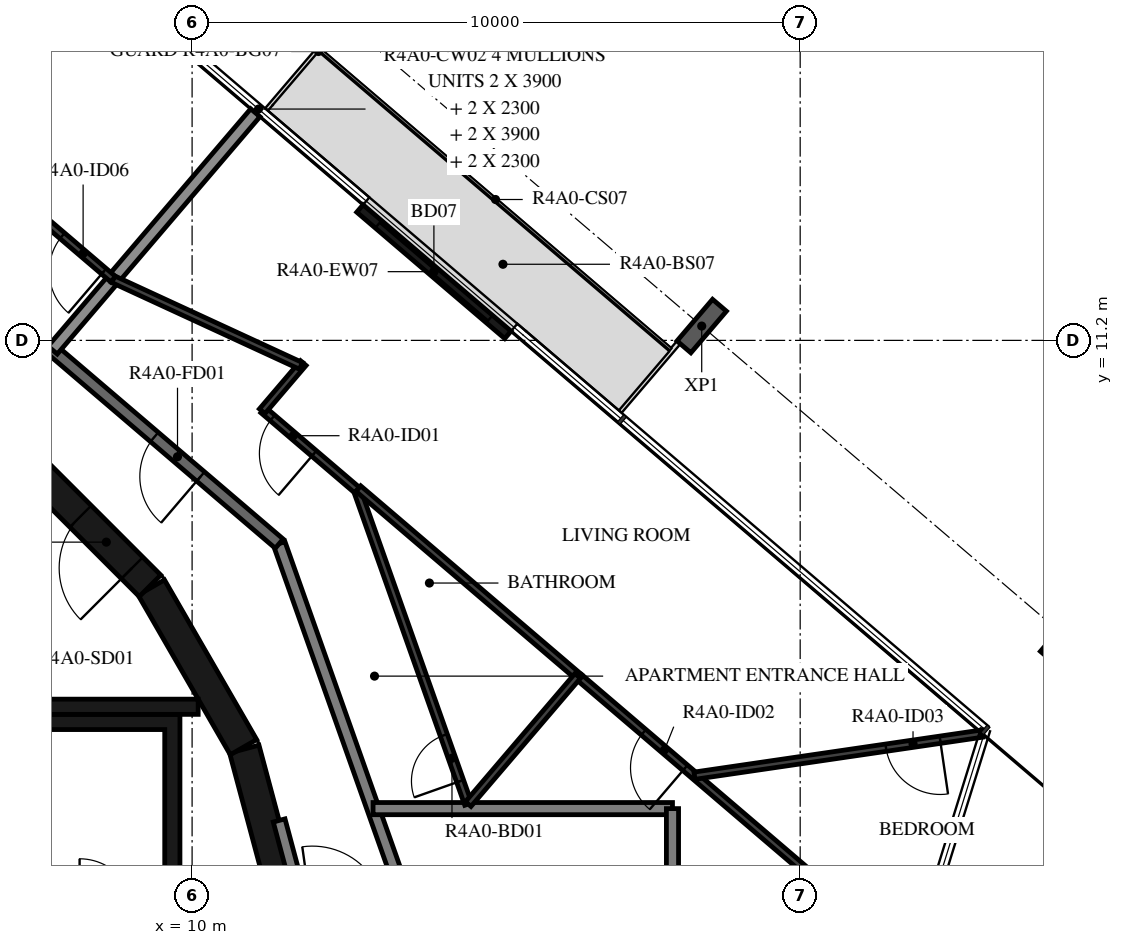
"""IFC4 building model, lengths in metres.
Left out: names, types, materials, properties, quantities, classifications, styles, units other than length and angle.
Written with IfcOpenShell. Run it as: python <this file> out.ifc"""

import sys

from ifc_helpers import new_model, si_unit, direction, frame, frame_2d, origin, origin_2d, place, context, subcontext, project, spatial, polyline, rectangle, i_section, outline, extrude, element, fill, save


model = new_model("IFC4")
c1 = context("Model", 3, precision=1e-05, world=origin(), true_north=direction((0.0, 1.0)))
c2 = subcontext(c1, "Body", "Model", "MODEL_VIEW")
j1 = project(units=[si_unit("LENGTHUNIT", "METRE"), si_unit("PLANEANGLEUNIT", "RADIAN")], contexts=[c1])
p1 = place(None, origin())
s1 = spatial("IfcSite", under=j1, at=p1, CompositionType="ELEMENT")
p2 = place(p1, origin())
s2 = spatial("IfcBuilding", under=s1, at=p2, CompositionType="ELEMENT")
p3 = place(p2, frame((0.0, 0.0, 158.7)))
s3 = spatial("IfcBuildingStorey", under=s2, at=p3, CompositionType="ELEMENT", Elevation=158.7)
for number, where, z_axis, x_axis in (
    (1, (24.358, 6.331, -0.38), (0.0, 0.0, 1.0), (0.76, -0.649, 0.0)),
    (2, (18.381, 11.436, -0.38), (0.0, 0.0, 1.0), (0.76, -0.649, 0.0)),
):
    element("IfcColumn", number, at=place(p3, frame(where, z_axis=z_axis, x_axis=x_axis)), inside=s3, PredefinedType="COLUMN", context=c2, shape_type="SweptSolid", body=[
        extrude(i_section(OverallWidth=0.3, OverallDepth=0.9, WebThickness=0.019, FlangeThickness=0.035, FilletRadius=0.03, at=origin_2d()), origin(), (0.0, 0.0, 1.0), 3.5),
    ])
p4 = place(p3, frame((15.193, 11.291, 0.0), z_axis=(0.0, 0.0, 1.0), x_axis=(-0.760391731187, 0.649464714317, 0.0)))
e3 = element("IfcWall", 3, at=p4, inside=s3, PredefinedType="STANDARD", context=c2, shape_type="SweptSolid", body=[
    extrude(rectangle(XDim=3.2, YDim=0.16, at=frame_2d((1.6, 0.0))), origin(), (0.0, 0.0, 1.0), 3.12),
])
p5 = place(p4, frame((0.4, 0.0, 0.0)))
e4 = element("IfcOpeningElement", 4, at=p5, cuts=e3, PredefinedType="OPENING", context=c2, shape_type="SweptSolid", body=[
    extrude(rectangle(XDim=2.4, YDim=2.4, at=frame_2d((1.2, 1.2))), frame((0.0, 0.09, 0.0), z_axis=(0.0, -1.0, 0.0), x_axis=(1.0, 0.0, 0.0)), (0.0, 0.0, 1.0), 0.18),
])
for number, where, z_axis, x_axis in (
    (5, (11.643, 1.55, 0.0), (0.0, 0.0, 1.0), (-0.259, 0.966, 0.0)),
    (6, (10.845, 4.51, 0.0), (0.0, 0.0, 1.0), (-0.5, 0.866, 0.0)),
):
    element("IfcWall", number, at=place(p3, frame(where, z_axis=z_axis, x_axis=x_axis)), inside=s3, PredefinedType="SHEAR", context=c2, shape_type="SweptSolid", body=[
        extrude(rectangle(XDim=3.033, YDim=0.5, at=frame_2d((1.516, 0.0))), origin(), (0.0, 0.0, 1.0), 3.12),
    ])
p6 = place(p3, frame((9.308, 7.164, 0.0), z_axis=(0.0, 0.0, 1.0), x_axis=(-0.707106781187, 0.707106781187, 0.0)))
e7 = element("IfcWall", 7, at=p6, inside=s3, PredefinedType="SHEAR", context=c2, shape_type="SweptSolid", body=[
    extrude(rectangle(XDim=3.032, YDim=0.5, at=frame_2d((1.516, 0.0))), origin(), (0.0, 0.0, 1.0), 3.12),
])
p7 = place(p6, frame((0.416, 0.0, 0.0)))
e8 = element("IfcOpeningElement", 8, at=p7, cuts=e7, PredefinedType="OPENING", context=c2, shape_type="SweptSolid", body=[
    extrude(rectangle(XDim=1.2, YDim=2.1, at=frame_2d((0.6, 1.05))), frame((0.0, 0.26, 0.0), z_axis=(0.0, -1.0, 0.0), x_axis=(1.0, 0.0, 0.0)), (0.0, 0.0, 1.0), 0.52),
])
p8 = place(p3, frame((7.0, 5.175, 0.0), z_axis=(0.0, 0.0, 1.0), x_axis=(1.0, 0.0, 0.0)))
e9 = element("IfcWall", 9, at=p8, inside=s3, PredefinedType="SHEAR", context=c2, shape_type="SweptSolid", body=[
    extrude(rectangle(XDim=3.1, YDim=0.25, at=frame_2d((1.55, 0.0))), origin(), (0.0, 0.0, 1.0), 3.12),
])
p9 = place(p3, origin())
e10 = element("IfcWall", 10, at=p9, inside=s3, PredefinedType="SHEAR", context=c2, shape_type="SweptSolid", body=[
    extrude(outline(polyline([(-9.55, 4.8), (-1.2, 4.8), (-1.2, 1.9), (-0.95, 1.9), (-0.95, 4.8), (0.95, 4.8), (0.95, 1.9), (1.2, 1.9), (1.2, 4.8), (3.1, 4.8), (3.1, 1.9), (3.35, 1.9), (3.35, 4.8), (5.25, 4.8), (5.25, 1.9), (5.5, 1.9), (5.5, 4.8), (7.4, 4.8), (7.4, 1.9), (7.65, 1.9), (7.65, 4.8), (9.55, 4.8), (9.55, 1.9), (9.8, 1.9), (9.8, 4.8), (9.8, 5.05), (-9.8, 5.05), (-9.8, 4.8), (-9.8, 1.9), (-9.55, 1.9), (-9.55, 4.8)])), origin(), (0.0, 0.0, 1.0), 3.12),
])
p10 = place(p3, frame((11.87, 1.668, 0.0), z_axis=(0.0, 0.0, 1.0), x_axis=(-0.258836880648, 0.965921047093, 0.0)))
e11 = element("IfcWall", 11, at=p10, inside=s3, PredefinedType="STANDARD", context=c2, shape_type="SweptSolid", body=[
    extrude(rectangle(XDim=1.695, YDim=0.2, at=frame_2d((0.848, 0.0))), origin(), (0.0, 0.0, 1.0), 3.12),
])
p11 = place(p3, frame((13.542, 1.903, 0.0), z_axis=(0.0, 0.0, 1.0), x_axis=(-0.333808508206, 0.942640907159, 0.0)))
e12 = element("IfcWall", 12, at=p11, inside=s3, PredefinedType="STANDARD", context=c2, shape_type="SweptSolid", body=[
    extrude(rectangle(XDim=6.317, YDim=0.2, at=frame_2d((3.158, 0.0))), origin(), (0.0, 0.0, 1.0), 3.12),
])
p12 = place(p3, frame((11.433, 7.858, 0.0), z_axis=(0.0, 0.0, 1.0), x_axis=(-0.760412154545, 0.649440801937, 0.0)))
e13 = element("IfcWall", 13, at=p12, inside=s3, PredefinedType="STANDARD", context=c2, shape_type="SweptSolid", body=[
    extrude(rectangle(XDim=7.181, YDim=0.2, at=frame_2d((3.59, 0.0))), origin(), (0.0, 0.0, 1.0), 3.12),
])
p13 = place(p12, frame((1.7, 0.0, 0.0)))
e14 = element("IfcOpeningElement", 14, at=p13, cuts=e13, PredefinedType="OPENING", context=c2, shape_type="SweptSolid", body=[
    extrude(rectangle(XDim=1.0, YDim=2.1, at=frame_2d((0.5, 1.05))), frame((0.0, 0.11, 0.0), z_axis=(0.0, -1.0, 0.0), x_axis=(1.0, 0.0, 0.0)), (0.0, 0.0, 1.0), 0.22),
])
p14 = place(p12, frame((5.101, 0.0, 0.0)))
e15 = element("IfcOpeningElement", 15, at=p14, cuts=e13, PredefinedType="OPENING", context=c2, shape_type="SweptSolid", body=[
    extrude(rectangle(XDim=1.0, YDim=2.1, at=frame_2d((0.5, 1.05))), frame((0.0, 0.11, 0.0), z_axis=(0.0, -1.0, 0.0), x_axis=(1.0, 0.0, 0.0)), (0.0, 0.0, 1.0), 0.22),
])
p15 = place(p3, frame((17.9, 3.5, 0.0), z_axis=(0.0, 0.0, 1.0), x_axis=(-1.0, 0.0, 0.0)))
e16 = element("IfcWall", 16, at=p15, inside=s3, PredefinedType="STANDARD", context=c2, shape_type="SweptSolid", body=[
    extrude(rectangle(XDim=4.924, YDim=0.2, at=frame_2d((2.462, 0.0))), origin(), (0.0, 0.0, 1.0), 3.12),
])
p16 = place(p3, frame((17.9, -3.318, 0.0), z_axis=(0.0, 0.0, 1.0), x_axis=(0.0, 1.0, 0.0)))
e17 = element("IfcWall", 17, at=p16, inside=s3, PredefinedType="STANDARD", context=c2, shape_type="SweptSolid", body=[
    extrude(rectangle(XDim=6.818, YDim=0.2, at=frame_2d((3.409, 0.0))), origin(), (0.0, 0.0, 1.0), 3.12),
])
p17 = place(p3, frame((11.04, 14.943, 0.0), z_axis=(0.0, 0.0, 1.0), x_axis=(-0.649442880087, -0.760410379666, 0.0)))
e18 = element("IfcWall", 18, at=p17, inside=s3, PredefinedType="STANDARD", context=c2, shape_type="SweptSolid", body=[
    extrude(rectangle(XDim=5.133, YDim=0.2, at=frame_2d((2.566, 0.0))), origin(), (0.0, 0.0, 1.0), 2.73),
])
p18 = place(p3, frame((14.541, 3.575, 0.0), z_axis=(0.0, 0.0, 1.0), x_axis=(-0.333799280318, 0.942644174893, 0.0)))
e19 = element("IfcWall", 19, at=p18, inside=s3, PredefinedType="PARTITIONING", context=c2, shape_type="SweptSolid", body=[
    extrude(rectangle(XDim=5.477, YDim=0.12, at=frame_2d((2.738, 0.0))), origin(), (0.0, 0.0, 1.0), 3.12),
])
p19 = place(p18, frame((0.4, 0.0, 0.0)))
e20 = element("IfcOpeningElement", 20, at=p19, cuts=e19, PredefinedType="OPENING", context=c2, shape_type="SweptSolid", body=[
    extrude(rectangle(XDim=0.8, YDim=2.1, at=frame_2d((0.4, 1.05))), frame((0.0, 0.07, 0.0), z_axis=(0.0, -1.0, 0.0), x_axis=(1.0, 0.0, 0.0)), (0.0, 0.0, 1.0), 0.14),
])
p20 = place(p3, frame((12.713, 8.737, 0.0), z_axis=(0.0, 0.0, 1.0), x_axis=(-0.760410825807, 0.649442357716, 0.0)))
e21 = element("IfcWall", 21, at=p20, inside=s3, PredefinedType="PARTITIONING", context=c2, shape_type="SweptSolid", body=[
    extrude(rectangle(XDim=2.029, YDim=0.12, at=frame_2d((1.014, 0.0))), origin(), (0.0, 0.0, 1.0), 3.12),
])
p21 = place(p20, frame((0.929, 0.0, 0.0)))
e22 = element("IfcOpeningElement", 22, at=p21, cuts=e21, PredefinedType="OPENING", context=c2, shape_type="SweptSolid", body=[
    extrude(rectangle(XDim=0.9, YDim=2.1, at=frame_2d((0.45, 1.05))), frame((0.0, 0.07, 0.0), z_axis=(0.0, -1.0, 0.0), x_axis=(1.0, 0.0, 0.0)), (0.0, 0.0, 1.0), 0.14),
])
p22 = place(p3, frame((12.734, 8.762, 0.0), z_axis=(0.0, 0.0, 1.0), x_axis=(0.760390484255, -0.649466174219, 0.0)))
e23 = element("IfcWall", 23, at=p22, inside=s3, PredefinedType="PARTITIONING", context=c2, shape_type="SweptSolid", body=[
    extrude(rectangle(XDim=4.783, YDim=0.12, at=frame_2d((2.391, 0.0))), origin(), (0.0, 0.0, 1.0), 3.12),
])
p23 = place(p3, frame((11.153, 10.034, 0.0), z_axis=(0.0, 0.0, 1.0), x_axis=(0.649381401329, 0.760462882466, 0.0)))
e24 = element("IfcWall", 24, at=p23, inside=s3, PredefinedType="PARTITIONING", context=c2, shape_type="SweptSolid", body=[
    extrude(rectangle(XDim=1.042, YDim=0.12, at=frame_2d((0.521, 0.0))), origin(), (0.0, 0.0, 1.0), 3.12),
])
p24 = place(p3, frame((11.79, 10.781, 0.0), z_axis=(0.0, 0.0, 1.0), x_axis=(-0.907999296286, 0.418971691101, 0.0)))
e25 = element("IfcWall", 25, at=p24, inside=s3, PredefinedType="PARTITIONING", context=c2, shape_type="SweptSolid", body=[
    extrude(rectangle(XDim=3.401, YDim=0.12, at=frame_2d((1.701, 0.0))), origin(), (0.0, 0.0, 1.0), 3.12),
])
p25 = place(p3, frame((23.411, -0.357, 0.0), z_axis=(0.0, 0.0, 1.0), x_axis=(-0.76041871148, 0.649433124525, 0.0)))
e26 = element("IfcWall", 26, at=p25, inside=s3, PredefinedType="PARTITIONING", context=c2, shape_type="SweptSolid", body=[
    extrude(rectangle(XDim=9.259, YDim=0.12, at=frame_2d((4.629, 0.0))), origin(), (0.0, 0.0, 1.0), 3.12),
])
p26 = place(p25, frame((6.972, 0.0, 0.0)))
e27 = element("IfcOpeningElement", 27, at=p26, cuts=e26, PredefinedType="OPENING", context=c2, shape_type="SweptSolid", body=[
    extrude(rectangle(XDim=0.9, YDim=2.1, at=frame_2d((0.45, 1.05))), frame((0.0, 0.07, 0.0), z_axis=(0.0, -1.0, 0.0), x_axis=(1.0, 0.0, 0.0)), (0.0, 0.0, 1.0), 0.14),
])
p27 = place(p25, frame((0.2, 0.0, 0.0)))
e28 = element("IfcOpeningElement", 28, at=p27, cuts=e26, PredefinedType="OPENING", context=c2, shape_type="SweptSolid", body=[
    extrude(rectangle(XDim=0.9, YDim=2.1, at=frame_2d((0.45, 1.05))), frame((0.0, 0.07, 0.0), z_axis=(0.0, -1.0, 0.0), x_axis=(1.0, 0.0, 0.0)), (0.0, 0.0, 1.0), 0.14),
])
p28 = place(p3, frame((16.341, 5.682, 0.0), z_axis=(0.0, 0.0, 1.0), x_axis=(-0.64946993237, -0.76038727432, 0.0)))
e29 = element("IfcWall", 29, at=p28, inside=s3, PredefinedType="PARTITIONING", context=c2, shape_type="SweptSolid", body=[
    extrude(rectangle(XDim=2.771, YDim=0.12, at=frame_2d((1.386, 0.0))), origin(), (0.0, 0.0, 1.0), 3.12),
])
p29 = place(p3, frame((22.994, 4.734, 0.0), z_axis=(0.0, 0.0, 1.0), x_axis=(-0.989449286977, -0.144879634529, 0.0)))
e30 = element("IfcWall", 30, at=p29, inside=s3, PredefinedType="PARTITIONING", context=c2, shape_type="SweptSolid", body=[
    extrude(rectangle(XDim=4.782, YDim=0.12, at=frame_2d((2.391, 0.0))), origin(), (0.0, 0.0, 1.0), 3.12),
])
p30 = place(p29, frame((0.7, 0.0, 0.0)))
e31 = element("IfcOpeningElement", 31, at=p30, cuts=e30, PredefinedType="OPENING", context=c2, shape_type="SweptSolid", body=[
    extrude(rectangle(XDim=0.9, YDim=2.1, at=frame_2d((0.45, 1.05))), frame((0.0, 0.07, 0.0), z_axis=(0.0, -1.0, 0.0), x_axis=(1.0, 0.0, 0.0)), (0.0, 0.0, 1.0), 0.14),
])
p31 = place(p3, frame((8.702, 12.206, 0.0), z_axis=(0.0, 0.0, 1.0), x_axis=(-0.760401313718, 0.649453494945, 0.0)))
e32 = element("IfcWall", 32, at=p31, inside=s3, PredefinedType="PARTITIONING", context=c2, shape_type="SweptSolid", body=[
    extrude(rectangle(XDim=16.724, YDim=0.12, at=frame_2d((8.362, 0.0))), origin(), (0.0, 0.0, 1.0), 3.12),
])
p32 = place(p31, frame((0.2, 0.0, 0.0)))
e33 = element("IfcOpeningElement", 33, at=p32, cuts=e32, PredefinedType="OPENING", context=c2, shape_type="SweptSolid", body=[
    extrude(rectangle(XDim=0.9, YDim=2.1, at=frame_2d((0.45, 1.05))), frame((0.0, 0.07, 0.0), z_axis=(0.0, -1.0, 0.0), x_axis=(1.0, 0.0, 0.0)), (0.0, 0.0, 1.0), 0.14),
])
p33 = place(p31, frame((7.099, 0.0, 0.0)))
e34 = element("IfcOpeningElement", 34, at=p33, cuts=e32, PredefinedType="OPENING", context=c2, shape_type="SweptSolid", body=[
    extrude(rectangle(XDim=0.9, YDim=2.1, at=frame_2d((0.45, 1.05))), frame((0.0, 0.07, 0.0), z_axis=(0.0, -1.0, 0.0), x_axis=(1.0, 0.0, 0.0)), (0.0, 0.0, 1.0), 0.14),
])
p34 = place(p5, origin())
e35 = element("IfcDoor", 35, at=p34, inside=s3, OperationType="DOUBLE_DOOR_SLIDING", PredefinedType="DOOR", context=c2, shape_type="SweptSolid", body=[
    extrude(rectangle(XDim=2.4, YDim=2.4, at=frame_2d((1.2, 1.2))), frame((0.0, 0.025, 0.0), z_axis=(0.0, -1.0, 0.0), x_axis=(1.0, 0.0, 0.0)), (0.0, 0.0, 1.0), 0.05),
])
fill(e4, e35)
p35 = place(p7, origin())
e36 = element("IfcDoor", 36, at=p35, inside=s3, OperationType="SINGLE_SWING_RIGHT", PredefinedType="DOOR", context=c2, shape_type="SweptSolid", body=[
    extrude(rectangle(XDim=1.2, YDim=2.1, at=frame_2d((0.6, 1.05))), frame((0.0, 0.025, 0.0), z_axis=(0.0, -1.0, 0.0), x_axis=(1.0, 0.0, 0.0)), (0.0, 0.0, 1.0), 0.05),
])
fill(e8, e36)
p36 = place(p13, origin())
e37 = element("IfcDoor", 37, at=p36, inside=s3, OperationType="SINGLE_SWING_LEFT", PredefinedType="DOOR", context=c2, shape_type="SweptSolid", body=[
    extrude(rectangle(XDim=1.0, YDim=2.1, at=frame_2d((0.5, 1.05))), frame((0.0, 0.025, 0.0), z_axis=(0.0, -1.0, 0.0), x_axis=(1.0, 0.0, 0.0)), (0.0, 0.0, 1.0), 0.05),
])
fill(e14, e37)
p37 = place(p19, origin())
e38 = element("IfcDoor", 38, at=p37, inside=s3, OperationType="SINGLE_SWING_LEFT", PredefinedType="DOOR", context=c2, shape_type="SweptSolid", body=[
    extrude(rectangle(XDim=0.8, YDim=2.1, at=frame_2d((0.4, 1.05))), frame((0.0, 0.025, 0.0), z_axis=(0.0, -1.0, 0.0), x_axis=(1.0, 0.0, 0.0)), (0.0, 0.0, 1.0), 0.05),
])
fill(e20, e38)
p38 = place(p21, origin())
e39 = element("IfcDoor", 39, at=p38, inside=s3, OperationType="SINGLE_SWING_LEFT", PredefinedType="DOOR", context=c2, shape_type="SweptSolid", body=[
    extrude(rectangle(XDim=0.9, YDim=2.1, at=frame_2d((0.45, 1.05))), frame((0.0, 0.025, 0.0), z_axis=(0.0, -1.0, 0.0), x_axis=(1.0, 0.0, 0.0)), (0.0, 0.0, 1.0), 0.05),
])
fill(e22, e39)
p39 = place(p26, origin())
e40 = element("IfcDoor", 40, at=p39, inside=s3, OperationType="SINGLE_SWING_RIGHT", PredefinedType="DOOR", context=c2, shape_type="SweptSolid", body=[
    extrude(rectangle(XDim=0.9, YDim=2.1, at=frame_2d((0.45, 1.05))), frame((0.0, 0.025, 0.0), z_axis=(0.0, -1.0, 0.0), x_axis=(1.0, 0.0, 0.0)), (0.0, 0.0, 1.0), 0.05),
])
fill(e27, e40)
p40 = place(p30, origin())
e41 = element("IfcDoor", 41, at=p40, inside=s3, OperationType="SINGLE_SWING_LEFT", PredefinedType="DOOR", context=c2, shape_type="SweptSolid", body=[
    extrude(rectangle(XDim=0.9, YDim=2.1, at=frame_2d((0.45, 1.05))), frame((0.0, 0.025, 0.0), z_axis=(0.0, -1.0, 0.0), x_axis=(1.0, 0.0, 0.0)), (0.0, 0.0, 1.0), 0.05),
])
fill(e31, e41)
p41 = place(p32, origin())
e42 = element("IfcDoor", 42, at=p41, inside=s3, OperationType="SINGLE_SWING_RIGHT", PredefinedType="DOOR", context=c2, shape_type="SweptSolid", body=[
    extrude(rectangle(XDim=0.9, YDim=2.1, at=frame_2d((0.45, 1.05))), frame((0.0, 0.025, 0.0), z_axis=(0.0, -1.0, 0.0), x_axis=(1.0, 0.0, 0.0)), (0.0, 0.0, 1.0), 0.05),
])
fill(e33, e42)
save(model, sys.argv[1])
